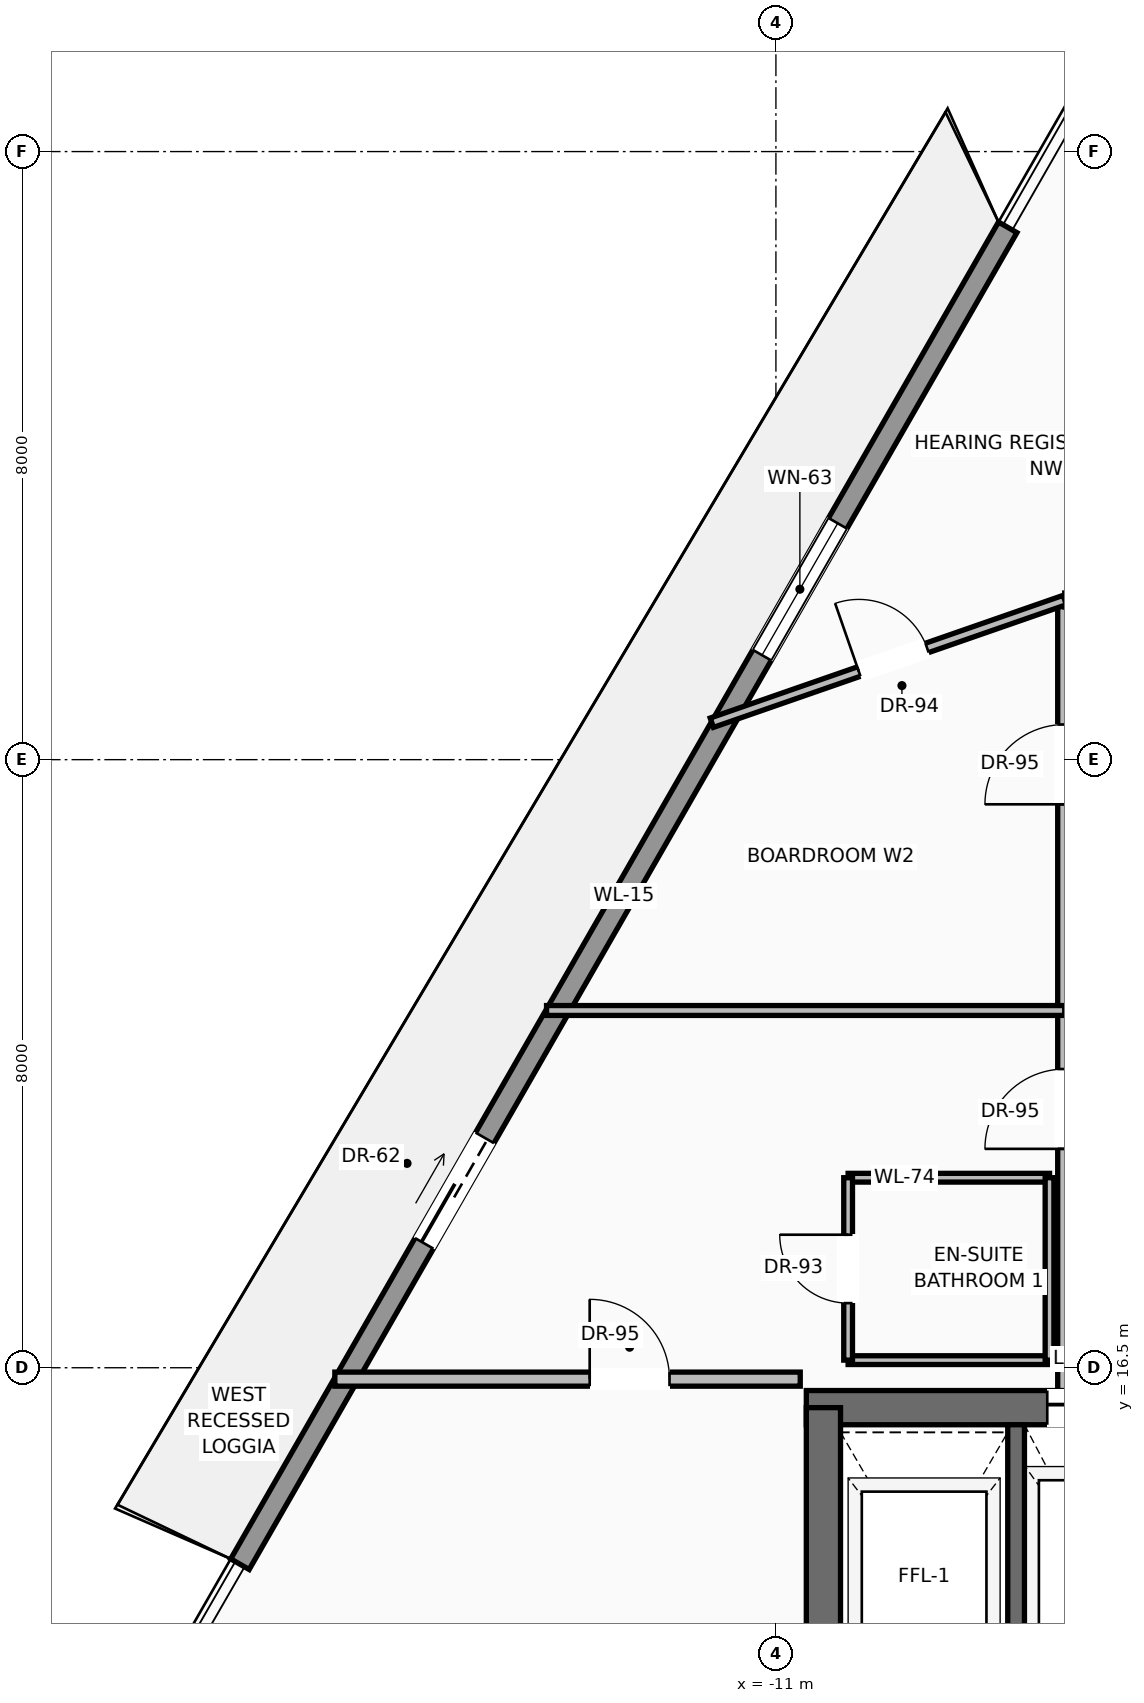
"""IFC4 building model, lengths in metres.
Left out: names, types, materials, properties, quantities, classifications, styles, units other than length and angle.
Written with IfcOpenShell. Run it as: python <this file> out.ifc"""

import sys

from ifc_helpers import new_model, si_unit, direction, frame, frame_2d, origin, place, context, subcontext, project, spatial, rectangle, extrude, source, transform, mapped, element, fill, save


model = new_model("IFC4")
c1 = context("Model", 3, precision=1e-05, world=origin(), true_north=direction((0.0, 1.0)))
c2 = subcontext(c1, "Body", "Model", "MODEL_VIEW")
j1 = project(units=[si_unit("LENGTHUNIT", "METRE"), si_unit("PLANEANGLEUNIT", "RADIAN")], contexts=[c1])
p1 = place(None, origin())
s1 = spatial("IfcSite", under=j1, at=p1, CompositionType="ELEMENT")
p2 = place(p1, origin())
s2 = spatial("IfcBuilding", under=s1, at=p2, CompositionType="ELEMENT")
p3 = place(p2, frame((0.0, 0.0, 290.25)))
s3 = spatial("IfcBuildingStorey", under=s2, at=p3, CompositionType="ELEMENT", Elevation=290.25)
p4 = place(p3, frame((-10.6, 15.975, 0.0), z_axis=(0.0, 0.0, 1.0), x_axis=(1.0, 0.0, 0.0)))
e1 = element("IfcWall", 1, at=p4, inside=s3, PredefinedType="SHEAR", context=c2, shape_type="SweptSolid", body=[
    extrude(rectangle(XDim=21.2, YDim=0.45, at=frame_2d((10.6, 0.0))), origin(), (0.0, 0.0, 1.0), 3.24),
])
p5 = place(p4, frame((3.17, 0.0, 0.0)))
e2 = element("IfcOpeningElement", 2, at=p5, cuts=e1, PredefinedType="OPENING", context=c2, shape_type="SweptSolid", body=[
    extrude(rectangle(XDim=1.3, YDim=2.3, at=frame_2d((0.65, 1.15))), frame((0.0, 0.235, 0.0), z_axis=(0.0, -1.0, 0.0), x_axis=(1.0, 0.0, 0.0)), (0.0, 0.0, 1.0), 0.47),
])
p6 = place(p4, frame((9.6, 0.0, 0.0)))
e3 = element("IfcOpeningElement", 3, at=p6, cuts=e1, PredefinedType="OPENING", context=c2, shape_type="SweptSolid", body=[
    extrude(rectangle(XDim=2.0, YDim=2.4, at=frame_2d((1.0, 1.2))), frame((0.0, 0.235, 0.0), z_axis=(0.0, -1.0, 0.0), x_axis=(1.0, 0.0, 0.0)), (0.0, 0.0, 1.0), 0.47),
])
p7 = place(p3, frame((-10.375, 0.625, 0.0), z_axis=(0.0, 0.0, 1.0), x_axis=(0.0, 1.0, 0.0)))
e4 = element("IfcWall", 4, at=p7, inside=s3, PredefinedType="SHEAR", context=c2, shape_type="SweptSolid", body=[
    extrude(rectangle(XDim=15.35, YDim=0.45, at=frame_2d((7.675, 0.0))), origin(), (0.0, 0.0, 1.0), 3.24),
])
p8 = place(p3, frame((-18.052, 13.915, 0.0), z_axis=(0.0, 0.0, 1.0), x_axis=(0.498040695355, 0.867153657532, 0.0)))
e5 = element("IfcWall", 5, at=p8, inside=s3, PredefinedType="SOLIDWALL", context=c2, shape_type="SweptSolid", body=[
    extrude(rectangle(XDim=20.283, YDim=0.28, at=frame_2d((10.141, 0.0))), origin(), (0.0, 0.0, 1.0), 2.82),
])
p9 = place(p8, frame((4.868, 0.0, 0.0)))
e6 = element("IfcOpeningElement", 6, at=p9, cuts=e5, PredefinedType="OPENING", context=c2, shape_type="SweptSolid", body=[
    extrude(rectangle(XDim=1.6, YDim=2.35, at=frame_2d((0.8, 1.175))), frame((0.0, 0.15, 0.0), z_axis=(0.0, -1.0, 0.0), x_axis=(1.0, 0.0, 0.0)), (0.0, 0.0, 1.0), 0.3),
])
p10 = place(p8, frame((13.792, 0.0, 0.9)))
e7 = element("IfcOpeningElement", 7, at=p10, cuts=e5, PredefinedType="OPENING", context=c2, shape_type="SweptSolid", body=[
    extrude(rectangle(XDim=2.0, YDim=1.75, at=frame_2d((1.0, 0.875))), frame((0.0, 0.15, 0.0), z_axis=(0.0, -1.0, 0.0), x_axis=(1.0, 0.0, 0.0)), (0.0, 0.0, 1.0), 0.3),
])
p11 = place(p3, frame((-7.84, 11.87, 0.0), z_axis=(0.0, 0.0, 1.0), x_axis=(0.0, 1.0, 0.0)))
e8 = element("IfcWall", 8, at=p11, inside=s3, PredefinedType="SOLIDWALL", context=c2, shape_type="SweptSolid", body=[
    extrude(rectangle(XDim=3.88, YDim=0.22, at=frame_2d((1.94, 0.0))), origin(), (0.0, 0.0, 1.0), 3.24),
])
p12 = place(p3, frame((-7.2, 16.2, 0.0), z_axis=(0.0, 0.0, 1.0), x_axis=(0.0, 1.0, 0.0)))
e9 = element("IfcWall", 9, at=p12, inside=s3, PredefinedType="PARTITIONING", context=c2, shape_type="SweptSolid", body=[
    extrude(rectangle(XDim=10.4, YDim=0.185, at=frame_2d((5.2, 0.0))), origin(), (0.0, 0.0, 1.0), 3.232),
])
p13 = place(p12, frame((3.18, 0.0, 0.0)))
e10 = element("IfcOpeningElement", 10, at=p13, cuts=e9, PredefinedType="OPENING", context=c2, shape_type="SweptSolid", body=[
    extrude(rectangle(XDim=1.05, YDim=2.25, at=frame_2d((0.525, 1.125))), frame((0.0, 0.103, 0.0), z_axis=(0.0, -1.0, 0.0), x_axis=(1.0, 0.0, 0.0)), (0.0, 0.0, 1.0), 0.205),
])
p14 = place(p12, frame((7.712, 0.0, 0.0)))
e11 = element("IfcOpeningElement", 11, at=p14, cuts=e9, PredefinedType="OPENING", context=c2, shape_type="SweptSolid", body=[
    extrude(rectangle(XDim=1.05, YDim=2.25, at=frame_2d((0.525, 1.125))), frame((0.0, 0.103, 0.0), z_axis=(0.0, -1.0, 0.0), x_axis=(1.0, 0.0, 0.0)), (0.0, 0.0, 1.0), 0.205),
])
p15 = place(p3, frame((-16.803, 16.35, 0.0), z_axis=(0.0, 0.0, 1.0), x_axis=(1.0, 0.0, 0.0)))
e12 = element("IfcWall", 12, at=p15, inside=s3, PredefinedType="PARTITIONING", context=c2, shape_type="SweptSolid", body=[
    extrude(rectangle(XDim=6.123, YDim=0.185, at=frame_2d((3.062, 0.0))), origin(), (0.0, 0.0, 1.0), 3.232),
])
p16 = place(p15, frame((3.353, 0.0, 0.0)))
e13 = element("IfcOpeningElement", 13, at=p16, cuts=e12, PredefinedType="OPENING", context=c2, shape_type="SweptSolid", body=[
    extrude(rectangle(XDim=1.05, YDim=2.25, at=frame_2d((0.525, 1.125))), frame((0.0, 0.103, 0.0), z_axis=(0.0, -1.0, 0.0), x_axis=(1.0, 0.0, 0.0)), (0.0, 0.0, 1.0), 0.205),
])
p17 = place(p3, frame((-11.844, 24.986, 0.0), z_axis=(0.0, 0.0, 1.0), x_axis=(0.944568461482, 0.328314516239, 0.0)))
e14 = element("IfcWall", 14, at=p17, inside=s3, PredefinedType="PARTITIONING", context=c2, shape_type="SweptSolid", body=[
    extrude(rectangle(XDim=4.916, YDim=0.13, at=frame_2d((2.458, 0.0))), origin(), (0.0, 0.0, 1.0), 3.232),
])
p18 = place(p17, frame((2.048, 0.0, 0.0)))
e15 = element("IfcOpeningElement", 15, at=p18, cuts=e14, PredefinedType="OPENING", context=c2, shape_type="SweptSolid", body=[
    extrude(rectangle(XDim=0.95, YDim=2.2, at=frame_2d((0.475, 1.1))), frame((0.0, 0.075, 0.0), z_axis=(0.0, -1.0, 0.0), x_axis=(1.0, 0.0, 0.0)), (0.0, 0.0, 1.0), 0.15),
])
for number, where, z_axis, x_axis in (
    (16, (-10.05, 16.6, 0.0), (0.0, 0.0, 1.0), (1.0, 0.0, 0.0)),
    (17, (-10.05, 19.0, 0.0), (0.0, 0.0, 1.0), (1.0, 0.0, 0.0)),
):
    element("IfcWall", number, at=place(p3, frame(where, z_axis=z_axis, x_axis=x_axis)), inside=s3, PredefinedType="PARTITIONING", context=c2, shape_type="SweptSolid", body=[
        extrude(rectangle(XDim=2.65, YDim=0.115, at=frame_2d((1.325, 0.0))), origin(), (0.0, 0.0, 1.0), 3.232),
    ])
p19 = place(p3, frame((-10.05, 16.6, 0.0), z_axis=(0.0, 0.0, 1.0), x_axis=(0.0, 1.0, 0.0)))
e18 = element("IfcWall", 18, at=p19, inside=s3, PredefinedType="PARTITIONING", context=c2, shape_type="SweptSolid", body=[
    extrude(rectangle(XDim=2.4, YDim=0.115, at=frame_2d((1.2, 0.0))), origin(), (0.0, 0.0, 1.0), 3.232),
])
p20 = place(p19, frame((0.75, 0.0, 0.0)))
e19 = element("IfcOpeningElement", 19, at=p20, cuts=e18, PredefinedType="OPENING", context=c2, shape_type="SweptSolid", body=[
    extrude(rectangle(XDim=0.9, YDim=2.15, at=frame_2d((0.45, 1.075))), frame((0.0, 0.067, 0.0), z_axis=(0.0, -1.0, 0.0), x_axis=(1.0, 0.0, 0.0)), (0.0, 0.0, 1.0), 0.135),
])
p21 = place(p3, frame((-7.4, 16.6, 0.0), z_axis=(0.0, 0.0, 1.0), x_axis=(0.0, 1.0, 0.0)))
e20 = element("IfcWall", 20, at=p21, inside=s3, PredefinedType="PARTITIONING", context=c2, shape_type="SweptSolid", body=[
    extrude(rectangle(XDim=2.4, YDim=0.115, at=frame_2d((1.2, 0.0))), origin(), (0.0, 0.0, 1.0), 3.232),
])
p22 = place(p3, frame((-14.018, 21.2, 0.0), z_axis=(0.0, 0.0, 1.0), x_axis=(1.0, 0.0, 0.0)))
e21 = element("IfcWall", 21, at=p22, inside=s3, PredefinedType="PARTITIONING", context=c2, shape_type="SweptSolid", body=[
    extrude(rectangle(XDim=6.818, YDim=0.13, at=frame_2d((3.409, 0.0))), origin(), (0.0, 0.0, 1.0), 3.232),
])
m1 = source(origin(), c2, "Body", "SweptSolid", [
    extrude(rectangle(XDim=1.6, YDim=2.35, at=frame_2d((0.8, 1.175))), frame((0.0, 0.025, 0.0), z_axis=(0.0, -1.0, 0.0), x_axis=(1.0, 0.0, 0.0)), (0.0, 0.0, 1.0), 0.05),
])
p23 = place(p9, origin())
e22 = element("IfcDoor", 22, at=p23, inside=s3, OperationType="SLIDING_TO_LEFT", PredefinedType="DOOR", context=c2, shape_type="MappedRepresentation", body=[
    mapped(m1, transform((0.0, 0.0, 0.0), scale=1.0)),
])
fill(e6, e22)
m2 = source(origin(), c2, "Body", "SweptSolid", [
    extrude(rectangle(XDim=2.0, YDim=1.75, at=frame_2d((1.0, 0.875))), frame((0.0, 0.03, 0.0), z_axis=(0.0, -1.0, 0.0), x_axis=(1.0, 0.0, 0.0)), (0.0, 0.0, 1.0), 0.06),
])
p24 = place(p10, origin())
e23 = element("IfcWindow", 23, at=p24, inside=s3, PartitioningType="SINGLE_PANEL", PredefinedType="WINDOW", context=c2, shape_type="MappedRepresentation", body=[
    mapped(m2, transform((0.0, 0.0, 0.0), scale=1.0)),
])
fill(e7, e23)
m3 = source(origin(), c2, "Body", "SweptSolid", [
    extrude(rectangle(XDim=1.3, YDim=2.3, at=frame_2d((0.65, 1.15))), frame((0.0, 0.025, 0.0), z_axis=(0.0, -1.0, 0.0), x_axis=(1.0, 0.0, 0.0)), (0.0, 0.0, 1.0), 0.05),
])
p25 = place(p5, origin())
e24 = element("IfcDoor", 24, at=p25, inside=s3, OperationType="SLIDING_TO_RIGHT", PredefinedType="DOOR", context=c2, shape_type="MappedRepresentation", body=[
    mapped(m3, transform((0.0, 0.0, 0.0), scale=1.0)),
])
fill(e2, e24)
m4 = source(origin(), c2, "Body", "SweptSolid", [
    extrude(rectangle(XDim=1.05, YDim=2.25, at=frame_2d((0.525, 1.125))), frame((0.0, 0.025, 0.0), z_axis=(0.0, -1.0, 0.0), x_axis=(1.0, 0.0, 0.0)), (0.0, 0.0, 1.0), 0.05),
])
p26 = place(p16, origin())
e25 = element("IfcDoor", 25, at=p26, inside=s3, OperationType="SINGLE_SWING_LEFT", PredefinedType="DOOR", context=c2, shape_type="MappedRepresentation", body=[
    mapped(m4, transform((0.0, 0.0, 0.0), scale=1.0)),
])
fill(e13, e25)
p27 = place(p13, origin())
e26 = element("IfcDoor", 26, at=p27, inside=s3, OperationType="SINGLE_SWING_LEFT", PredefinedType="DOOR", context=c2, shape_type="MappedRepresentation", body=[
    mapped(m4, transform((0.0, 0.0, 0.0), scale=1.0)),
])
fill(e10, e26)
m5 = source(origin(), c2, "Body", "SweptSolid", [
    extrude(rectangle(XDim=0.9, YDim=2.15, at=frame_2d((0.45, 1.075))), frame((0.0, 0.025, 0.0), z_axis=(0.0, -1.0, 0.0), x_axis=(1.0, 0.0, 0.0)), (0.0, 0.0, 1.0), 0.05),
])
p28 = place(p20, origin())
e27 = element("IfcDoor", 27, at=p28, inside=s3, OperationType="SINGLE_SWING_RIGHT", PredefinedType="DOOR", context=c2, shape_type="MappedRepresentation", body=[
    mapped(m5, transform((0.0, 0.0, 0.0), scale=1.0)),
])
fill(e19, e27)
p29 = place(p14, origin())
e28 = element("IfcDoor", 28, at=p29, inside=s3, OperationType="SINGLE_SWING_LEFT", PredefinedType="DOOR", context=c2, shape_type="MappedRepresentation", body=[
    mapped(m4, transform((0.0, 0.0, 0.0), scale=1.0)),
])
fill(e11, e28)
m6 = source(origin(), c2, "Body", "SweptSolid", [
    extrude(rectangle(XDim=0.95, YDim=2.2, at=frame_2d((0.475, 1.1))), frame((0.0, 0.025, 0.0), z_axis=(0.0, -1.0, 0.0), x_axis=(1.0, 0.0, 0.0)), (0.0, 0.0, 1.0), 0.05),
])
p30 = place(p18, origin())
e29 = element("IfcDoor", 29, at=p30, inside=s3, OperationType="SINGLE_SWING_LEFT", PredefinedType="DOOR", context=c2, shape_type="MappedRepresentation", body=[
    mapped(m6, transform((0.0, 0.0, 0.0), scale=1.0)),
])
fill(e15, e29)
save(model, sys.argv[1])
